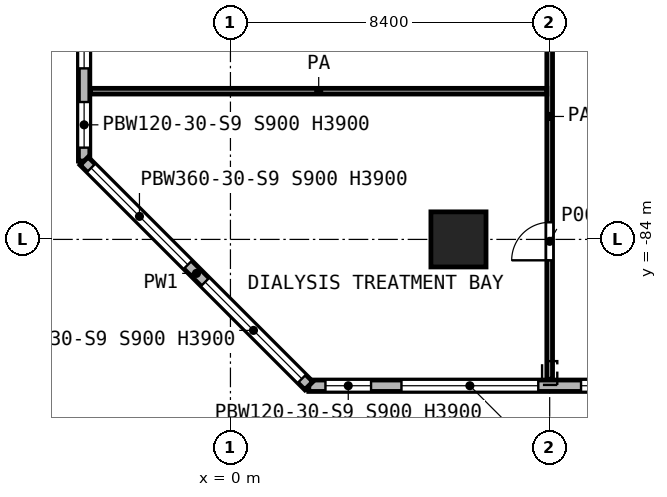
"""IFC4 building model, lengths in metres.
Left out: names, types, materials, properties, quantities, classifications, styles, units other than length and angle.
Written with IfcOpenShell. Run it as: python <this file> out.ifc"""

import sys

from ifc_helpers import new_model, si_unit, direction, frame, frame_2d, origin, origin_2d, place, context, subcontext, project, spatial, rectangle, extrude, element, fill, save


model = new_model("IFC4")
c1 = context("Model", 3, precision=1e-05, world=origin(), true_north=direction((0.0, 1.0)))
c2 = subcontext(c1, "Body", "Model", "MODEL_VIEW")
j1 = project(units=[si_unit("LENGTHUNIT", "METRE"), si_unit("PLANEANGLEUNIT", "RADIAN")], contexts=[c1])
p1 = place(None, origin())
s1 = spatial("IfcSite", under=j1, at=p1, CompositionType="ELEMENT")
p2 = place(p1, origin())
s2 = spatial("IfcBuilding", under=s1, at=p2, CompositionType="ELEMENT")
p3 = place(p2, frame((0.0, 0.0, 29.0)))
s3 = spatial("IfcBuildingStorey", under=s2, at=p3, CompositionType="ELEMENT", Elevation=29.0)
p4 = place(p3, frame((6.0, -84.0, 0.0), z_axis=(0.0, 0.0, 1.0), x_axis=(1.0, 0.0, 0.0)))
e1 = element("IfcColumn", 1, at=p4, inside=s3, PredefinedType="COLUMN", context=c2, shape_type="SweptSolid", body=[
    extrude(rectangle(XDim=1.45, YDim=1.45, at=origin_2d()), origin(), (0.0, 0.0, 1.0), 5.2),
])
p5 = place(p3, frame((-3.85, -2.062, 0.0), z_axis=(0.0, 0.0, 1.0), x_axis=(0.0, -1.0, 0.0)))
e2 = element("IfcWall", 2, at=p5, inside=s3, PredefinedType="SOLIDWALL", context=c2, shape_type="SweptSolid", body=[
    extrude(rectangle(XDim=79.876, YDim=0.3, at=frame_2d((39.938, 0.0))), origin(), (0.0, 0.0, 1.0), 4.7),
])
p6 = place(p5, frame((0.438, 0.0, 0.9)))
e3 = element("IfcOpeningElement", 3, at=p6, cuts=e2, PredefinedType="OPENING", context=c2, shape_type="SweptSolid", body=[
    extrude(rectangle(XDim=1.2, YDim=3.0, at=frame_2d((0.6, 1.5))), frame((0.0, 0.16, 0.0), z_axis=(0.0, -1.0, 0.0), x_axis=(1.0, 0.0, 0.0)), (0.0, 0.0, 1.0), 0.32),
])
p7 = place(p5, frame((2.438, 0.0, 0.9)))
e4 = element("IfcOpeningElement", 4, at=p7, cuts=e2, PredefinedType="OPENING", context=c2, shape_type="SweptSolid", body=[
    extrude(rectangle(XDim=3.6, YDim=3.0, at=frame_2d((1.8, 1.5))), frame((0.0, 0.16, 0.0), z_axis=(0.0, -1.0, 0.0), x_axis=(1.0, 0.0, 0.0)), (0.0, 0.0, 1.0), 0.32),
])
p8 = place(p5, frame((6.638, 0.0, 0.9)))
e5 = element("IfcOpeningElement", 5, at=p8, cuts=e2, PredefinedType="OPENING", context=c2, shape_type="SweptSolid", body=[
    extrude(rectangle(XDim=3.6, YDim=3.0, at=frame_2d((1.8, 1.5))), frame((0.0, 0.16, 0.0), z_axis=(0.0, -1.0, 0.0), x_axis=(1.0, 0.0, 0.0)), (0.0, 0.0, 1.0), 0.32),
])
p9 = place(p5, frame((10.838, 0.0, 0.9)))
e6 = element("IfcOpeningElement", 6, at=p9, cuts=e2, PredefinedType="OPENING", context=c2, shape_type="SweptSolid", body=[
    extrude(rectangle(XDim=3.6, YDim=3.0, at=frame_2d((1.8, 1.5))), frame((0.0, 0.16, 0.0), z_axis=(0.0, -1.0, 0.0), x_axis=(1.0, 0.0, 0.0)), (0.0, 0.0, 1.0), 0.32),
])
p10 = place(p5, frame((15.038, 0.0, 0.9)))
e7 = element("IfcOpeningElement", 7, at=p10, cuts=e2, PredefinedType="OPENING", context=c2, shape_type="SweptSolid", body=[
    extrude(rectangle(XDim=3.6, YDim=3.0, at=frame_2d((1.8, 1.5))), frame((0.0, 0.16, 0.0), z_axis=(0.0, -1.0, 0.0), x_axis=(1.0, 0.0, 0.0)), (0.0, 0.0, 1.0), 0.32),
])
p11 = place(p5, frame((19.238, 0.0, 0.9)))
e8 = element("IfcOpeningElement", 8, at=p11, cuts=e2, PredefinedType="OPENING", context=c2, shape_type="SweptSolid", body=[
    extrude(rectangle(XDim=3.6, YDim=3.0, at=frame_2d((1.8, 1.5))), frame((0.0, 0.16, 0.0), z_axis=(0.0, -1.0, 0.0), x_axis=(1.0, 0.0, 0.0)), (0.0, 0.0, 1.0), 0.32),
])
p12 = place(p5, frame((24.323, 0.0, 0.9)))
e9 = element("IfcOpeningElement", 9, at=p12, cuts=e2, PredefinedType="OPENING", context=c2, shape_type="SweptSolid", body=[
    extrude(rectangle(XDim=2.4, YDim=3.0, at=frame_2d((1.2, 1.5))), frame((0.0, 0.16, 0.0), z_axis=(0.0, -1.0, 0.0), x_axis=(1.0, 0.0, 0.0)), (0.0, 0.0, 1.0), 0.32),
])
p13 = place(p5, frame((27.638, 0.0, 0.9)))
e10 = element("IfcOpeningElement", 10, at=p13, cuts=e2, PredefinedType="OPENING", context=c2, shape_type="SweptSolid", body=[
    extrude(rectangle(XDim=3.6, YDim=3.0, at=frame_2d((1.8, 1.5))), frame((0.0, 0.16, 0.0), z_axis=(0.0, -1.0, 0.0), x_axis=(1.0, 0.0, 0.0)), (0.0, 0.0, 1.0), 0.32),
])
p14 = place(p5, frame((32.823, 0.0, 0.9)))
e11 = element("IfcOpeningElement", 11, at=p14, cuts=e2, PredefinedType="OPENING", context=c2, shape_type="SweptSolid", body=[
    extrude(rectangle(XDim=2.4, YDim=3.0, at=frame_2d((1.2, 1.5))), frame((0.0, 0.16, 0.0), z_axis=(0.0, -1.0, 0.0), x_axis=(1.0, 0.0, 0.0)), (0.0, 0.0, 1.0), 0.32),
])
p15 = place(p5, frame((36.038, 0.0, 0.9)))
e12 = element("IfcOpeningElement", 12, at=p15, cuts=e2, PredefinedType="OPENING", context=c2, shape_type="SweptSolid", body=[
    extrude(rectangle(XDim=3.6, YDim=3.0, at=frame_2d((1.8, 1.5))), frame((0.0, 0.16, 0.0), z_axis=(0.0, -1.0, 0.0), x_axis=(1.0, 0.0, 0.0)), (0.0, 0.0, 1.0), 0.32),
])
p16 = place(p5, frame((40.603, 0.0, 0.9)))
e13 = element("IfcOpeningElement", 13, at=p16, cuts=e2, PredefinedType="OPENING", context=c2, shape_type="SweptSolid", body=[
    extrude(rectangle(XDim=2.4, YDim=3.0, at=frame_2d((1.2, 1.5))), frame((0.0, 0.16, 0.0), z_axis=(0.0, -1.0, 0.0), x_axis=(1.0, 0.0, 0.0)), (0.0, 0.0, 1.0), 0.32),
])
p17 = place(p5, frame((44.438, 0.0, 0.9)))
e14 = element("IfcOpeningElement", 14, at=p17, cuts=e2, PredefinedType="OPENING", context=c2, shape_type="SweptSolid", body=[
    extrude(rectangle(XDim=3.6, YDim=3.0, at=frame_2d((1.8, 1.5))), frame((0.0, 0.16, 0.0), z_axis=(0.0, -1.0, 0.0), x_axis=(1.0, 0.0, 0.0)), (0.0, 0.0, 1.0), 0.32),
])
p18 = place(p5, frame((48.638, 0.0, 0.9)))
e15 = element("IfcOpeningElement", 15, at=p18, cuts=e2, PredefinedType="OPENING", context=c2, shape_type="SweptSolid", body=[
    extrude(rectangle(XDim=3.6, YDim=3.0, at=frame_2d((1.8, 1.5))), frame((0.0, 0.16, 0.0), z_axis=(0.0, -1.0, 0.0), x_axis=(1.0, 0.0, 0.0)), (0.0, 0.0, 1.0), 0.32),
])
p19 = place(p5, frame((52.838, 0.0, 0.9)))
e16 = element("IfcOpeningElement", 16, at=p19, cuts=e2, PredefinedType="OPENING", context=c2, shape_type="SweptSolid", body=[
    extrude(rectangle(XDim=3.6, YDim=3.0, at=frame_2d((1.8, 1.5))), frame((0.0, 0.16, 0.0), z_axis=(0.0, -1.0, 0.0), x_axis=(1.0, 0.0, 0.0)), (0.0, 0.0, 1.0), 0.32),
])
p20 = place(p5, frame((57.038, 0.0, 0.9)))
e17 = element("IfcOpeningElement", 17, at=p20, cuts=e2, PredefinedType="OPENING", context=c2, shape_type="SweptSolid", body=[
    extrude(rectangle(XDim=3.6, YDim=3.0, at=frame_2d((1.8, 1.5))), frame((0.0, 0.16, 0.0), z_axis=(0.0, -1.0, 0.0), x_axis=(1.0, 0.0, 0.0)), (0.0, 0.0, 1.0), 0.32),
])
p21 = place(p5, frame((62.073, 0.0, 0.9)))
e18 = element("IfcOpeningElement", 18, at=p21, cuts=e2, PredefinedType="OPENING", context=c2, shape_type="SweptSolid", body=[
    extrude(rectangle(XDim=2.4, YDim=3.0, at=frame_2d((1.2, 1.5))), frame((0.0, 0.16, 0.0), z_axis=(0.0, -1.0, 0.0), x_axis=(1.0, 0.0, 0.0)), (0.0, 0.0, 1.0), 0.32),
])
p22 = place(p5, frame((65.438, 0.0, 0.9)))
e19 = element("IfcOpeningElement", 19, at=p22, cuts=e2, PredefinedType="OPENING", context=c2, shape_type="SweptSolid", body=[
    extrude(rectangle(XDim=3.6, YDim=3.0, at=frame_2d((1.8, 1.5))), frame((0.0, 0.16, 0.0), z_axis=(0.0, -1.0, 0.0), x_axis=(1.0, 0.0, 0.0)), (0.0, 0.0, 1.0), 0.32),
])
p23 = place(p5, frame((70.038, 0.0, 0.9)))
e20 = element("IfcOpeningElement", 20, at=p23, cuts=e2, PredefinedType="OPENING", context=c2, shape_type="SweptSolid", body=[
    extrude(rectangle(XDim=1.2, YDim=3.0, at=frame_2d((0.6, 1.5))), frame((0.0, 0.16, 0.0), z_axis=(0.0, -1.0, 0.0), x_axis=(1.0, 0.0, 0.0)), (0.0, 0.0, 1.0), 0.32),
])
p24 = place(p5, frame((73.838, 0.0, 0.9)))
e21 = element("IfcOpeningElement", 21, at=p24, cuts=e2, PredefinedType="OPENING", context=c2, shape_type="SweptSolid", body=[
    extrude(rectangle(XDim=3.6, YDim=3.0, at=frame_2d((1.8, 1.5))), frame((0.0, 0.16, 0.0), z_axis=(0.0, -1.0, 0.0), x_axis=(1.0, 0.0, 0.0)), (0.0, 0.0, 1.0), 0.32),
])
p25 = place(p5, frame((78.323, 0.0, 0.9)))
e22 = element("IfcOpeningElement", 22, at=p25, cuts=e2, PredefinedType="OPENING", context=c2, shape_type="SweptSolid", body=[
    extrude(rectangle(XDim=1.2, YDim=3.0, at=frame_2d((0.6, 1.5))), frame((0.0, 0.16, 0.0), z_axis=(0.0, -1.0, 0.0), x_axis=(1.0, 0.0, 0.0)), (0.0, 0.0, 1.0), 0.32),
])
p26 = place(p3, frame((-3.85, -81.938, 0.0), z_axis=(0.0, 0.0, 1.0), x_axis=(0.707106781187, -0.707106781187, 0.0)))
e23 = element("IfcWall", 23, at=p26, inside=s3, PredefinedType="SOLIDWALL", context=c2, shape_type="SweptSolid", body=[
    extrude(rectangle(XDim=8.361, YDim=0.3, at=frame_2d((4.181, 0.0))), origin(), (0.0, 0.0, 1.0), 4.7),
])
p27 = place(p26, frame((0.259, 0.0, 0.9)))
e24 = element("IfcOpeningElement", 24, at=p27, cuts=e23, PredefinedType="OPENING", context=c2, shape_type="SweptSolid", body=[
    extrude(rectangle(XDim=3.6, YDim=3.0, at=frame_2d((1.8, 1.5))), frame((0.0, 0.16, 0.0), z_axis=(0.0, -1.0, 0.0), x_axis=(1.0, 0.0, 0.0)), (0.0, 0.0, 1.0), 0.32),
])
p28 = place(p26, frame((4.502, 0.0, 0.9)))
e25 = element("IfcOpeningElement", 25, at=p28, cuts=e23, PredefinedType="OPENING", context=c2, shape_type="SweptSolid", body=[
    extrude(rectangle(XDim=3.6, YDim=3.0, at=frame_2d((1.8, 1.5))), frame((0.0, 0.16, 0.0), z_axis=(0.0, -1.0, 0.0), x_axis=(1.0, 0.0, 0.0)), (0.0, 0.0, 1.0), 0.32),
])
p29 = place(p3, frame((2.062, -87.85, 0.0), z_axis=(0.0, 0.0, 1.0), x_axis=(1.0, 0.0, 0.0)))
e26 = element("IfcWall", 26, at=p29, inside=s3, PredefinedType="SOLIDWALL", context=c2, shape_type="SweptSolid", body=[
    extrude(rectangle(XDim=29.476, YDim=0.3, at=frame_2d((14.738, 0.0))), origin(), (0.0, 0.0, 1.0), 4.7),
])
p30 = place(p29, frame((0.438, 0.0, 0.9)))
e27 = element("IfcOpeningElement", 27, at=p30, cuts=e26, PredefinedType="OPENING", context=c2, shape_type="SweptSolid", body=[
    extrude(rectangle(XDim=1.2, YDim=3.0, at=frame_2d((0.6, 1.5))), frame((0.0, 0.16, 0.0), z_axis=(0.0, -1.0, 0.0), x_axis=(1.0, 0.0, 0.0)), (0.0, 0.0, 1.0), 0.32),
])
p31 = place(p29, frame((2.438, 0.0, 0.9)))
e28 = element("IfcOpeningElement", 28, at=p31, cuts=e26, PredefinedType="OPENING", context=c2, shape_type="SweptSolid", body=[
    extrude(rectangle(XDim=3.6, YDim=3.0, at=frame_2d((1.8, 1.5))), frame((0.0, 0.16, 0.0), z_axis=(0.0, -1.0, 0.0), x_axis=(1.0, 0.0, 0.0)), (0.0, 0.0, 1.0), 0.32),
])
p32 = place(p29, frame((7.163, 0.0, 0.9)))
e29 = element("IfcOpeningElement", 29, at=p32, cuts=e26, PredefinedType="OPENING", context=c2, shape_type="SweptSolid", body=[
    extrude(rectangle(XDim=1.2, YDim=3.0, at=frame_2d((0.6, 1.5))), frame((0.0, 0.16, 0.0), z_axis=(0.0, -1.0, 0.0), x_axis=(1.0, 0.0, 0.0)), (0.0, 0.0, 1.0), 0.32),
])
p33 = place(p29, frame((10.838, 0.0, 0.9)))
e30 = element("IfcOpeningElement", 30, at=p33, cuts=e26, PredefinedType="OPENING", context=c2, shape_type="SweptSolid", body=[
    extrude(rectangle(XDim=3.6, YDim=3.0, at=frame_2d((1.8, 1.5))), frame((0.0, 0.16, 0.0), z_axis=(0.0, -1.0, 0.0), x_axis=(1.0, 0.0, 0.0)), (0.0, 0.0, 1.0), 0.32),
])
p34 = place(p29, frame((15.038, 0.0, 0.9)))
e31 = element("IfcOpeningElement", 31, at=p34, cuts=e26, PredefinedType="OPENING", context=c2, shape_type="SweptSolid", body=[
    extrude(rectangle(XDim=3.6, YDim=3.0, at=frame_2d((1.8, 1.5))), frame((0.0, 0.16, 0.0), z_axis=(0.0, -1.0, 0.0), x_axis=(1.0, 0.0, 0.0)), (0.0, 0.0, 1.0), 0.32),
])
p35 = place(p29, frame((19.238, 0.0, 0.9)))
e32 = element("IfcOpeningElement", 32, at=p35, cuts=e26, PredefinedType="OPENING", context=c2, shape_type="SweptSolid", body=[
    extrude(rectangle(XDim=3.6, YDim=3.0, at=frame_2d((1.8, 1.5))), frame((0.0, 0.16, 0.0), z_axis=(0.0, -1.0, 0.0), x_axis=(1.0, 0.0, 0.0)), (0.0, 0.0, 1.0), 0.32),
])
p36 = place(p29, frame((23.438, 0.0, 0.9)))
e33 = element("IfcOpeningElement", 33, at=p36, cuts=e26, PredefinedType="OPENING", context=c2, shape_type="SweptSolid", body=[
    extrude(rectangle(XDim=3.6, YDim=3.0, at=frame_2d((1.8, 1.5))), frame((0.0, 0.16, 0.0), z_axis=(0.0, -1.0, 0.0), x_axis=(1.0, 0.0, 0.0)), (0.0, 0.0, 1.0), 0.32),
])
p37 = place(p29, frame((27.838, 0.0, 0.9)))
e34 = element("IfcOpeningElement", 34, at=p37, cuts=e26, PredefinedType="OPENING", context=c2, shape_type="SweptSolid", body=[
    extrude(rectangle(XDim=1.2, YDim=3.0, at=frame_2d((0.6, 1.5))), frame((0.0, 0.16, 0.0), z_axis=(0.0, -1.0, 0.0), x_axis=(1.0, 0.0, 0.0)), (0.0, 0.0, 1.0), 0.32),
])
p38 = place(p3, frame((-3.68, -80.1, 0.0), z_axis=(0.0, 0.0, 1.0), x_axis=(1.0, 0.0, 0.0)))
e35 = element("IfcWall", 35, at=p38, inside=s3, PredefinedType="PARTITIONING", context=c2, shape_type="SweptSolid", body=[
    extrude(rectangle(XDim=12.005, YDim=0.15, at=frame_2d((6.002, 0.0))), origin(), (0.0, 0.0, 1.0), 4.7),
])
p39 = place(p3, frame((8.4, -87.68, 0.0), z_axis=(0.0, 0.0, 1.0), x_axis=(0.0, 1.0, 0.0)))
e36 = element("IfcWall", 36, at=p39, inside=s3, PredefinedType="PARTITIONING", context=c2, shape_type="SweptSolid", body=[
    extrude(rectangle(XDim=13.83, YDim=0.15, at=frame_2d((6.915, 0.0))), origin(), (0.0, 0.0, 1.0), 4.7),
])
p40 = place(p39, frame((10.205, 0.0, 0.0)))
e37 = element("IfcOpeningElement", 37, at=p40, cuts=e36, PredefinedType="OPENING", context=c2, shape_type="SweptSolid", body=[
    extrude(rectangle(XDim=1.0, YDim=2.1, at=frame_2d((0.5, 1.05))), frame((0.0, 0.085, 0.0), z_axis=(0.0, -1.0, 0.0), x_axis=(1.0, 0.0, 0.0)), (0.0, 0.0, 1.0), 0.17),
])
p41 = place(p39, frame((3.13, 0.0, 0.0)))
e38 = element("IfcOpeningElement", 38, at=p41, cuts=e36, PredefinedType="OPENING", context=c2, shape_type="SweptSolid", body=[
    extrude(rectangle(XDim=1.0, YDim=2.1, at=frame_2d((0.5, 1.05))), frame((0.0, 0.085, 0.0), z_axis=(0.0, -1.0, 0.0), x_axis=(1.0, 0.0, 0.0)), (0.0, 0.0, 1.0), 0.17),
])
p42 = place(p24, origin())
e39 = element("IfcWindow", 39, at=p42, inside=s3, PartitioningType="SINGLE_PANEL", PredefinedType="WINDOW", context=c2, shape_type="SweptSolid", body=[
    extrude(rectangle(XDim=3.6, YDim=3.0, at=frame_2d((1.8, 1.5))), frame((0.0, 0.03, 0.0), z_axis=(0.0, -1.0, 0.0), x_axis=(1.0, 0.0, 0.0)), (0.0, 0.0, 1.0), 0.06),
])
fill(e21, e39)
p43 = place(p25, origin())
e40 = element("IfcWindow", 40, at=p43, inside=s3, PartitioningType="SINGLE_PANEL", PredefinedType="WINDOW", context=c2, shape_type="SweptSolid", body=[
    extrude(rectangle(XDim=1.2, YDim=3.0, at=frame_2d((0.6, 1.5))), frame((0.0, 0.03, 0.0), z_axis=(0.0, -1.0, 0.0), x_axis=(1.0, 0.0, 0.0)), (0.0, 0.0, 1.0), 0.06),
])
fill(e22, e40)
p44 = place(p27, origin())
e41 = element("IfcWindow", 41, at=p44, inside=s3, PartitioningType="SINGLE_PANEL", PredefinedType="WINDOW", context=c2, shape_type="SweptSolid", body=[
    extrude(rectangle(XDim=3.6, YDim=3.0, at=frame_2d((1.8, 1.5))), frame((0.0, 0.03, 0.0), z_axis=(0.0, -1.0, 0.0), x_axis=(1.0, 0.0, 0.0)), (0.0, 0.0, 1.0), 0.06),
])
fill(e24, e41)
p45 = place(p28, origin())
e42 = element("IfcWindow", 42, at=p45, inside=s3, PartitioningType="SINGLE_PANEL", PredefinedType="WINDOW", context=c2, shape_type="SweptSolid", body=[
    extrude(rectangle(XDim=3.6, YDim=3.0, at=frame_2d((1.8, 1.5))), frame((0.0, 0.03, 0.0), z_axis=(0.0, -1.0, 0.0), x_axis=(1.0, 0.0, 0.0)), (0.0, 0.0, 1.0), 0.06),
])
fill(e25, e42)
p46 = place(p30, origin())
e43 = element("IfcWindow", 43, at=p46, inside=s3, PartitioningType="SINGLE_PANEL", PredefinedType="WINDOW", context=c2, shape_type="SweptSolid", body=[
    extrude(rectangle(XDim=1.2, YDim=3.0, at=frame_2d((0.6, 1.5))), frame((0.0, 0.03, 0.0), z_axis=(0.0, -1.0, 0.0), x_axis=(1.0, 0.0, 0.0)), (0.0, 0.0, 1.0), 0.06),
])
fill(e27, e43)
p47 = place(p31, origin())
e44 = element("IfcWindow", 44, at=p47, inside=s3, PartitioningType="SINGLE_PANEL", PredefinedType="WINDOW", context=c2, shape_type="SweptSolid", body=[
    extrude(rectangle(XDim=3.6, YDim=3.0, at=frame_2d((1.8, 1.5))), frame((0.0, 0.03, 0.0), z_axis=(0.0, -1.0, 0.0), x_axis=(1.0, 0.0, 0.0)), (0.0, 0.0, 1.0), 0.06),
])
fill(e28, e44)
p48 = place(p32, origin())
e45 = element("IfcWindow", 45, at=p48, inside=s3, PartitioningType="SINGLE_PANEL", PredefinedType="WINDOW", context=c2, shape_type="SweptSolid", body=[
    extrude(rectangle(XDim=1.2, YDim=3.0, at=frame_2d((0.6, 1.5))), frame((0.0, 0.03, 0.0), z_axis=(0.0, -1.0, 0.0), x_axis=(1.0, 0.0, 0.0)), (0.0, 0.0, 1.0), 0.06),
])
fill(e29, e45)
p49 = place(p41, origin())
e46 = element("IfcDoor", 46, at=p49, inside=s3, OperationType="SINGLE_SWING_LEFT", PredefinedType="DOOR", context=c2, shape_type="SweptSolid", body=[
    extrude(rectangle(XDim=1.0, YDim=2.1, at=frame_2d((0.5, 1.05))), frame((0.0, 0.025, 0.0), z_axis=(0.0, -1.0, 0.0), x_axis=(1.0, 0.0, 0.0)), (0.0, 0.0, 1.0), 0.05),
])
fill(e38, e46)
save(model, sys.argv[1])
